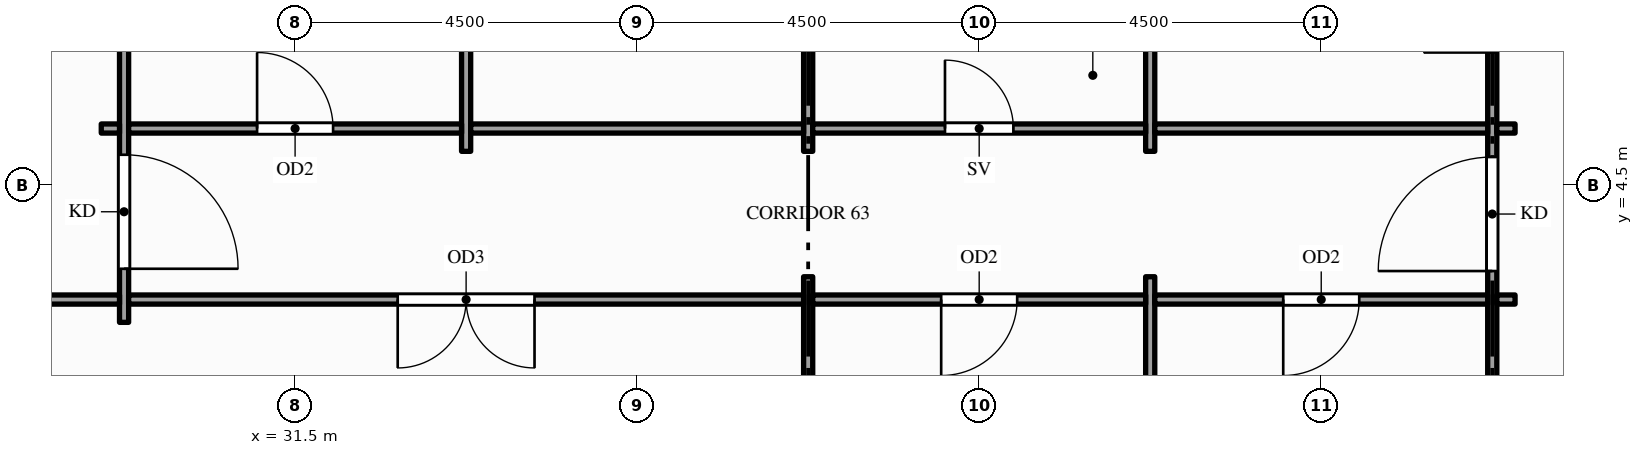
"""IFC4 building model, lengths in metres.
Left out: names, types, materials, properties, quantities, classifications, styles, units other than length and angle.
Written with IfcOpenShell. Run it as: python <this file> out.ifc"""

import sys

from ifc_helpers import new_model, si_unit, direction, frame, frame_2d, origin, place, context, subcontext, project, spatial, rectangle, extrude, element, fill, save


model = new_model("IFC4")
c1 = context("Model", 3, precision=1e-05, world=origin(), true_north=direction((0.0, 1.0)))
c2 = subcontext(c1, "Body", "Model", "MODEL_VIEW")
j1 = project(units=[si_unit("LENGTHUNIT", "METRE"), si_unit("PLANEANGLEUNIT", "RADIAN")], contexts=[c1])
p1 = place(None, origin())
s1 = spatial("IfcSite", under=j1, at=p1, CompositionType="ELEMENT")
p2 = place(p1, origin())
s2 = spatial("IfcBuilding", under=s1, at=p2, CompositionType="ELEMENT")
p3 = place(p2, frame((0.0, 0.0, 227.0)))
s3 = spatial("IfcBuildingStorey", under=s2, at=p3, CompositionType="ELEMENT", Elevation=227.0)
p4 = place(p3, frame((29.25, 2.7, 0.0), z_axis=(0.0, 0.0, 1.0), x_axis=(0.0, 1.0, 0.0)))
e1 = element("IfcWall", 1, at=p4, inside=s3, PredefinedType="PARTITIONING", context=c2, shape_type="SweptSolid", body=[
    extrude(rectangle(XDim=14.1, YDim=0.12, at=frame_2d((7.05, 0.0))), origin(), (0.0, 0.0, 1.0), 2.87),
])
p5 = place(p4, frame((0.705, 0.0, 0.0)))
e2 = element("IfcOpeningElement", 2, at=p5, cuts=e1, PredefinedType="OPENING", context=c2, shape_type="SweptSolid", body=[
    extrude(rectangle(XDim=1.5, YDim=2.1, at=frame_2d((0.75, 1.05))), frame((0.0, 0.07, 0.0), z_axis=(0.0, -1.0, 0.0), x_axis=(1.0, 0.0, 0.0)), (0.0, 0.0, 1.0), 0.14),
])
p6 = place(p4, frame((11.895, 0.0, 0.0)))
e3 = element("IfcOpeningElement", 3, at=p6, cuts=e1, PredefinedType="OPENING", context=c2, shape_type="SweptSolid", body=[
    extrude(rectangle(XDim=1.5, YDim=2.1, at=frame_2d((0.75, 1.05))), frame((0.0, 0.07, 0.0), z_axis=(0.0, -1.0, 0.0), x_axis=(1.0, 0.0, 0.0)), (0.0, 0.0, 1.0), 0.14),
])
p7 = place(p3, frame((33.75, 4.95, 0.0), z_axis=(0.0, 0.0, 1.0), x_axis=(0.0, 1.0, 0.0)))
e4 = element("IfcWall", 4, at=p7, inside=s3, PredefinedType="PARTITIONING", context=c2, shape_type="SweptSolid", body=[
    extrude(rectangle(XDim=9.6, YDim=0.12, at=frame_2d((4.8, 0.0))), origin(), (0.0, 0.0, 1.0), 2.87),
])
p8 = place(p3, frame((38.25, -1.35, 0.0), z_axis=(0.0, 0.0, 1.0), x_axis=(0.0, 1.0, 0.0)))
e5 = element("IfcWall", 5, at=p8, inside=s3, PredefinedType="PARTITIONING", context=c2, shape_type="SweptSolid", body=[
    extrude(rectangle(XDim=4.65, YDim=0.12, at=frame_2d((2.325, 0.0))), origin(), (0.0, 0.0, 1.0), 2.87),
])
p9 = place(p3, frame((38.25, 4.95, 0.0), z_axis=(0.0, 0.0, 1.0), x_axis=(0.0, 1.0, 0.0)))
e6 = element("IfcWall", 6, at=p9, inside=s3, PredefinedType="PARTITIONING", context=c2, shape_type="SweptSolid", body=[
    extrude(rectangle(XDim=9.6, YDim=0.12, at=frame_2d((4.8, 0.0))), origin(), (0.0, 0.0, 1.0), 2.87),
])
p10 = place(p3, frame((42.75, -1.35, 0.0), z_axis=(0.0, 0.0, 1.0), x_axis=(0.0, 1.0, 0.0)))
e7 = element("IfcWall", 7, at=p10, inside=s3, PredefinedType="PARTITIONING", context=c2, shape_type="SweptSolid", body=[
    extrude(rectangle(XDim=4.65, YDim=0.12, at=frame_2d((2.325, 0.0))), origin(), (0.0, 0.0, 1.0), 2.87),
])
p11 = place(p3, frame((42.75, 4.95, 0.0), z_axis=(0.0, 0.0, 1.0), x_axis=(0.0, 1.0, 0.0)))
e8 = element("IfcWall", 8, at=p11, inside=s3, PredefinedType="PARTITIONING", context=c2, shape_type="SweptSolid", body=[
    extrude(rectangle(XDim=9.6, YDim=0.12, at=frame_2d((4.8, 0.0))), origin(), (0.0, 0.0, 1.0), 2.87),
])
p12 = place(p3, frame((47.25, -1.35, 0.0), z_axis=(0.0, 0.0, 1.0), x_axis=(0.0, 1.0, 0.0)))
e9 = element("IfcWall", 9, at=p12, inside=s3, PredefinedType="PARTITIONING", context=c2, shape_type="SweptSolid", body=[
    extrude(rectangle(XDim=22.2, YDim=0.12, at=frame_2d((11.1, 0.0))), origin(), (0.0, 0.0, 1.0), 2.87),
])
p13 = place(p12, frame((4.725, 0.0, 0.0)))
e10 = element("IfcOpeningElement", 10, at=p13, cuts=e9, PredefinedType="OPENING", context=c2, shape_type="SweptSolid", body=[
    extrude(rectangle(XDim=1.5, YDim=2.1, at=frame_2d((0.75, 1.05))), frame((0.0, 0.07, 0.0), z_axis=(0.0, -1.0, 0.0), x_axis=(1.0, 0.0, 0.0)), (0.0, 0.0, 1.0), 0.14),
])
p14 = place(p12, frame((15.975, 0.0, 0.0)))
e11 = element("IfcOpeningElement", 11, at=p14, cuts=e9, PredefinedType="OPENING", context=c2, shape_type="SweptSolid", body=[
    extrude(rectangle(XDim=1.5, YDim=2.1, at=frame_2d((0.75, 1.05))), frame((0.0, 0.07, 0.0), z_axis=(0.0, -1.0, 0.0), x_axis=(1.0, 0.0, 0.0)), (0.0, 0.0, 1.0), 0.14),
])
p15 = place(p12, frame((7.6, 0.0, 0.0)))
e12 = element("IfcOpeningElement", 12, at=p15, cuts=e9, PredefinedType="OPENING", context=c2, shape_type="SweptSolid", body=[
    extrude(rectangle(XDim=0.9, YDim=2.1, at=frame_2d((0.45, 1.05))), frame((0.0, 0.07, 0.0), z_axis=(0.0, -1.0, 0.0), x_axis=(1.0, 0.0, 0.0)), (0.0, 0.0, 1.0), 0.14),
])
p16 = place(p12, frame((10.65, 0.0, 0.0)))
e13 = element("IfcOpeningElement", 13, at=p16, cuts=e9, PredefinedType="OPENING", context=c2, shape_type="SweptSolid", body=[
    extrude(rectangle(XDim=0.9, YDim=2.1, at=frame_2d((0.45, 1.05))), frame((0.0, 0.07, 0.0), z_axis=(0.0, -1.0, 0.0), x_axis=(1.0, 0.0, 0.0)), (0.0, 0.0, 1.0), 0.14),
])
p17 = place(p12, frame((13.6, 0.0, 0.0)))
e14 = element("IfcOpeningElement", 14, at=p17, cuts=e9, PredefinedType="OPENING", context=c2, shape_type="SweptSolid", body=[
    extrude(rectangle(XDim=1.0, YDim=2.1, at=frame_2d((0.5, 1.05))), frame((0.0, 0.07, 0.0), z_axis=(0.0, -1.0, 0.0), x_axis=(1.0, 0.0, 0.0)), (0.0, 0.0, 1.0), 0.14),
])
p18 = place(p3, frame((27.06, 3.0, 0.0), z_axis=(0.0, 0.0, 1.0), x_axis=(1.0, 0.0, 0.0)))
e15 = element("IfcWall", 15, at=p18, inside=s3, PredefinedType="PARTITIONING", context=c2, shape_type="SweptSolid", body=[
    extrude(rectangle(XDim=2.13, YDim=0.12, at=frame_2d((1.065, 0.0))), origin(), (0.0, 0.0, 1.0), 2.87),
])
p19 = place(p3, frame((29.31, 3.0, 0.0), z_axis=(0.0, 0.0, 1.0), x_axis=(1.0, 0.0, 0.0)))
e16 = element("IfcWall", 16, at=p19, inside=s3, PredefinedType="PARTITIONING", context=c2, shape_type="SweptSolid", body=[
    extrude(rectangle(XDim=8.88, YDim=0.12, at=frame_2d((4.44, 0.0))), origin(), (0.0, 0.0, 1.0), 2.87),
])
p20 = place(p19, frame((3.54, 0.0, 0.0)))
e17 = element("IfcOpeningElement", 17, at=p20, cuts=e16, PredefinedType="OPENING", context=c2, shape_type="SweptSolid", body=[
    extrude(rectangle(XDim=1.8, YDim=2.1, at=frame_2d((0.9, 1.05))), frame((0.0, 0.07, 0.0), z_axis=(0.0, -1.0, 0.0), x_axis=(1.0, 0.0, 0.0)), (0.0, 0.0, 1.0), 0.14),
])
p21 = place(p3, frame((38.31, 3.0, 0.0), z_axis=(0.0, 0.0, 1.0), x_axis=(1.0, 0.0, 0.0)))
e18 = element("IfcWall", 18, at=p21, inside=s3, PredefinedType="PARTITIONING", context=c2, shape_type="SweptSolid", body=[
    extrude(rectangle(XDim=4.38, YDim=0.12, at=frame_2d((2.19, 0.0))), origin(), (0.0, 0.0, 1.0), 2.87),
])
p22 = place(p21, frame((1.69, 0.0, 0.0)))
e19 = element("IfcOpeningElement", 19, at=p22, cuts=e18, PredefinedType="OPENING", context=c2, shape_type="SweptSolid", body=[
    extrude(rectangle(XDim=1.0, YDim=2.1, at=frame_2d((0.5, 1.05))), frame((0.0, 0.07, 0.0), z_axis=(0.0, -1.0, 0.0), x_axis=(1.0, 0.0, 0.0)), (0.0, 0.0, 1.0), 0.14),
])
p23 = place(p3, frame((42.81, 3.0, 0.0), z_axis=(0.0, 0.0, 1.0), x_axis=(1.0, 0.0, 0.0)))
e20 = element("IfcWall", 20, at=p23, inside=s3, PredefinedType="PARTITIONING", context=c2, shape_type="SweptSolid", body=[
    extrude(rectangle(XDim=4.38, YDim=0.12, at=frame_2d((2.19, 0.0))), origin(), (0.0, 0.0, 1.0), 2.87),
])
p24 = place(p23, frame((1.69, 0.0, 0.0)))
e21 = element("IfcOpeningElement", 21, at=p24, cuts=e20, PredefinedType="OPENING", context=c2, shape_type="SweptSolid", body=[
    extrude(rectangle(XDim=1.0, YDim=2.1, at=frame_2d((0.5, 1.05))), frame((0.0, 0.07, 0.0), z_axis=(0.0, -1.0, 0.0), x_axis=(1.0, 0.0, 0.0)), (0.0, 0.0, 1.0), 0.14),
])
for number, where, z_axis, x_axis in (
    (22, (47.31, 3.0, 0.0), (0.0, 0.0, 1.0), (1.0, 0.0, 0.0)),
    (23, (28.95, 5.25, 0.0), (0.0, 0.0, 1.0), (1.0, 0.0, 0.0)),
):
    element("IfcWall", number, at=place(p3, frame(where, z_axis=z_axis, x_axis=x_axis)), inside=s3, PredefinedType="PARTITIONING", context=c2, shape_type="SweptSolid", body=[
        extrude(rectangle(XDim=0.24, YDim=0.12, at=frame_2d((0.12, 0.0))), origin(), (0.0, 0.0, 1.0), 2.87),
    ])
p25 = place(p3, frame((29.31, 5.25, 0.0), z_axis=(0.0, 0.0, 1.0), x_axis=(1.0, 0.0, 0.0)))
e24 = element("IfcWall", 24, at=p25, inside=s3, PredefinedType="PARTITIONING", context=c2, shape_type="SweptSolid", body=[
    extrude(rectangle(XDim=4.38, YDim=0.12, at=frame_2d((2.19, 0.0))), origin(), (0.0, 0.0, 1.0), 2.87),
])
p26 = place(p25, frame((1.69, 0.0, 0.0)))
e25 = element("IfcOpeningElement", 25, at=p26, cuts=e24, PredefinedType="OPENING", context=c2, shape_type="SweptSolid", body=[
    extrude(rectangle(XDim=1.0, YDim=2.1, at=frame_2d((0.5, 1.05))), frame((0.0, 0.07, 0.0), z_axis=(0.0, -1.0, 0.0), x_axis=(1.0, 0.0, 0.0)), (0.0, 0.0, 1.0), 0.14),
])
p27 = place(p3, frame((33.81, 5.25, 0.0), z_axis=(0.0, 0.0, 1.0), x_axis=(1.0, 0.0, 0.0)))
e26 = element("IfcWall", 26, at=p27, inside=s3, PredefinedType="PARTITIONING", context=c2, shape_type="SweptSolid", body=[
    extrude(rectangle(XDim=4.38, YDim=0.12, at=frame_2d((2.19, 0.0))), origin(), (0.0, 0.0, 1.0), 2.87),
])
p28 = place(p3, frame((38.31, 5.25, 0.0), z_axis=(0.0, 0.0, 1.0), x_axis=(1.0, 0.0, 0.0)))
e27 = element("IfcWall", 27, at=p28, inside=s3, PredefinedType="PARTITIONING", context=c2, shape_type="SweptSolid", body=[
    extrude(rectangle(XDim=4.38, YDim=0.12, at=frame_2d((2.19, 0.0))), origin(), (0.0, 0.0, 1.0), 2.87),
])
p29 = place(p28, frame((1.74, 0.0, 0.0)))
e28 = element("IfcOpeningElement", 28, at=p29, cuts=e27, PredefinedType="OPENING", context=c2, shape_type="SweptSolid", body=[
    extrude(rectangle(XDim=0.9, YDim=2.1, at=frame_2d((0.45, 1.05))), frame((0.0, 0.07, 0.0), z_axis=(0.0, -1.0, 0.0), x_axis=(1.0, 0.0, 0.0)), (0.0, 0.0, 1.0), 0.14),
])
p30 = place(p3, frame((42.81, 5.25, 0.0), z_axis=(0.0, 0.0, 1.0), x_axis=(1.0, 0.0, 0.0)))
e29 = element("IfcWall", 29, at=p30, inside=s3, PredefinedType="PARTITIONING", context=c2, shape_type="SweptSolid", body=[
    extrude(rectangle(XDim=4.38, YDim=0.12, at=frame_2d((2.19, 0.0))), origin(), (0.0, 0.0, 1.0), 2.87),
])
p31 = place(p3, frame((47.31, 5.25, 0.0), z_axis=(0.0, 0.0, 1.0), x_axis=(1.0, 0.0, 0.0)))
e30 = element("IfcWall", 30, at=p31, inside=s3, PredefinedType="PARTITIONING", context=c2, shape_type="SweptSolid", body=[
    extrude(rectangle(XDim=0.24, YDim=0.12, at=frame_2d((0.12, 0.0))), origin(), (0.0, 0.0, 1.0), 2.87),
])
p32 = place(p5, origin())
e31 = element("IfcDoor", 31, at=p32, inside=s3, OperationType="SINGLE_SWING_LEFT", PredefinedType="DOOR", context=c2, shape_type="SweptSolid", body=[
    extrude(rectangle(XDim=1.5, YDim=2.1, at=frame_2d((0.75, 1.05))), frame((0.0, 0.025, 0.0), z_axis=(0.0, -1.0, 0.0), x_axis=(1.0, 0.0, 0.0)), (0.0, 0.0, 1.0), 0.05),
])
fill(e2, e31)
p33 = place(p13, origin())
e32 = element("IfcDoor", 32, at=p33, inside=s3, OperationType="SINGLE_SWING_LEFT", PredefinedType="DOOR", context=c2, shape_type="SweptSolid", body=[
    extrude(rectangle(XDim=1.5, YDim=2.1, at=frame_2d((0.75, 1.05))), frame((0.0, 0.025, 0.0), z_axis=(0.0, -1.0, 0.0), x_axis=(1.0, 0.0, 0.0)), (0.0, 0.0, 1.0), 0.05),
])
fill(e10, e32)
p34 = place(p26, origin())
e33 = element("IfcDoor", 33, at=p34, inside=s3, OperationType="SINGLE_SWING_LEFT", PredefinedType="DOOR", context=c2, shape_type="SweptSolid", body=[
    extrude(rectangle(XDim=1.0, YDim=2.1, at=frame_2d((0.5, 1.05))), frame((0.0, 0.025, 0.0), z_axis=(0.0, -1.0, 0.0), x_axis=(1.0, 0.0, 0.0)), (0.0, 0.0, 1.0), 0.05),
])
fill(e25, e33)
p35 = place(p29, origin())
e34 = element("IfcDoor", 34, at=p35, inside=s3, OperationType="SINGLE_SWING_LEFT", PredefinedType="DOOR", context=c2, shape_type="SweptSolid", body=[
    extrude(rectangle(XDim=0.9, YDim=2.1, at=frame_2d((0.45, 1.05))), frame((0.0, 0.025, 0.0), z_axis=(0.0, -1.0, 0.0), x_axis=(1.0, 0.0, 0.0)), (0.0, 0.0, 1.0), 0.05),
])
fill(e28, e34)
p36 = place(p20, origin())
e35 = element("IfcDoor", 35, at=p36, inside=s3, OperationType="DOUBLE_DOOR_SINGLE_SWING", PredefinedType="DOOR", context=c2, shape_type="SweptSolid", body=[
    extrude(rectangle(XDim=1.8, YDim=2.1, at=frame_2d((0.9, 1.05))), frame((0.0, 0.025, 0.0), z_axis=(0.0, -1.0, 0.0), x_axis=(1.0, 0.0, 0.0)), (0.0, 0.0, 1.0), 0.05),
])
fill(e17, e35)
p37 = place(p22, origin())
e36 = element("IfcDoor", 36, at=p37, inside=s3, OperationType="SINGLE_SWING_LEFT", PredefinedType="DOOR", context=c2, shape_type="SweptSolid", body=[
    extrude(rectangle(XDim=1.0, YDim=2.1, at=frame_2d((0.5, 1.05))), frame((0.0, 0.025, 0.0), z_axis=(0.0, -1.0, 0.0), x_axis=(1.0, 0.0, 0.0)), (0.0, 0.0, 1.0), 0.05),
])
fill(e19, e36)
p38 = place(p24, origin())
e37 = element("IfcDoor", 37, at=p38, inside=s3, OperationType="SINGLE_SWING_LEFT", PredefinedType="DOOR", context=c2, shape_type="SweptSolid", body=[
    extrude(rectangle(XDim=1.0, YDim=2.1, at=frame_2d((0.5, 1.05))), frame((0.0, 0.025, 0.0), z_axis=(0.0, -1.0, 0.0), x_axis=(1.0, 0.0, 0.0)), (0.0, 0.0, 1.0), 0.05),
])
fill(e21, e37)
save(model, sys.argv[1])
